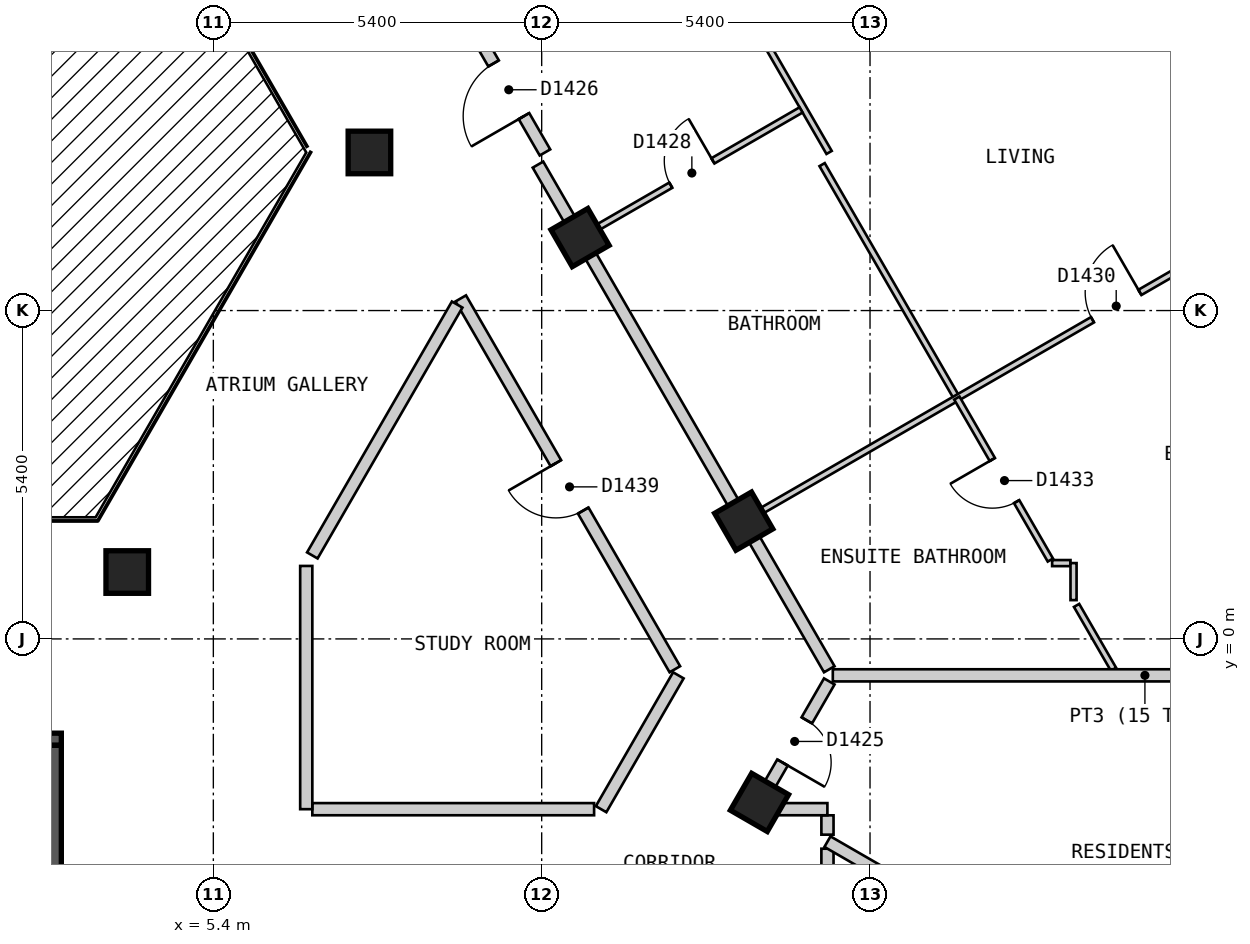
"""IFC4 building model, lengths in metres.
Left out: names, types, materials, properties, quantities, classifications, styles, units other than length and angle.
Written with IfcOpenShell. Run it as: python <this file> out.ifc"""

import sys

from ifc_helpers import new_model, si_unit, direction, frame, frame_2d, origin, origin_2d, place, context, subcontext, project, spatial, polyline, rectangle, outline, extrude, element, fill, save


model = new_model("IFC4")
c1 = context("Model", 3, precision=1e-05, world=origin(), true_north=direction((0.0, 1.0)))
c2 = subcontext(c1, "Body", "Model", "MODEL_VIEW")
j1 = project(units=[si_unit("LENGTHUNIT", "METRE"), si_unit("PLANEANGLEUNIT", "RADIAN")], contexts=[c1])
p1 = place(None, origin())
s1 = spatial("IfcSite", under=j1, at=p1, CompositionType="ELEMENT")
p2 = place(p1, origin())
s2 = spatial("IfcBuilding", under=s1, at=p2, CompositionType="ELEMENT")
p3 = place(p2, frame((0.0, 0.0, 166.2)))
s3 = spatial("IfcBuildingStorey", under=s2, at=p3, CompositionType="ELEMENT", Elevation=166.2)
for number, where, z_axis, x_axis in (
    (1, (14.382, -2.689, 0.0), (0.0, 0.0, 1.0), (0.5, 0.866, 0.0)),
    (2, (14.123, 1.937, 0.0), (0.0, 0.0, 1.0), (-0.5, 0.866, 0.0)),
    (3, (3.984, 1.1, 0.0), (0.0, 0.0, 1.0), (1.0, 0.0, 0.0)),
    (4, (11.431, 6.6, 0.0), (0.0, 0.0, 1.0), (-0.5, 0.866, 0.0)),
    (5, (7.967, 8.0, 0.0), (0.0, 0.0, 1.0), (1.0, 0.0, 0.0)),
):
    element("IfcColumn", number, at=place(p3, frame(where, z_axis=z_axis, x_axis=x_axis)), inside=s3, PredefinedType="COLUMN", context=c2, shape_type="SweptSolid", body=[
        extrude(rectangle(XDim=0.7, YDim=0.7, at=origin_2d()), origin(), (0.0, 0.0, 1.0), 3.0),
    ])
p4 = place(p3, frame((15.631, -21.025, 0.0), z_axis=(0.0, 0.0, 1.0), x_axis=(0.500018670445, 0.86601462413, 0.0)))
e6 = element("IfcWall", 6, at=p4, inside=s3, PredefinedType="SOLIDWALL", context=c2, shape_type="SweptSolid", body=[
    extrude(outline(polyline([(0.0, -0.15), (20.785, -0.15), (20.705, 0.15), (0.08, 0.15), (0.0, -0.15)])), origin(), (0.0, 0.0, 1.0), 2.7),
])
p5 = place(p4, frame((1.13, 0.0, 0.15)))
e7 = element("IfcOpeningElement", 7, at=p5, cuts=e6, PredefinedType="OPENING", context=c2, shape_type="SweptSolid", body=[
    extrude(rectangle(XDim=1.5, YDim=2.1, at=frame_2d((0.75, 1.05))), frame((0.0, 0.16, 0.0), z_axis=(0.0, -1.0, 0.0), x_axis=(1.0, 0.0, 0.0)), (0.0, 0.0, 1.0), 0.32),
])
p6 = place(p4, frame((3.562, 0.0, 0.15)))
e8 = element("IfcOpeningElement", 8, at=p6, cuts=e6, PredefinedType="OPENING", context=c2, shape_type="SweptSolid", body=[
    extrude(rectangle(XDim=1.5, YDim=2.1, at=frame_2d((0.75, 1.05))), frame((0.0, 0.16, 0.0), z_axis=(0.0, -1.0, 0.0), x_axis=(1.0, 0.0, 0.0)), (0.0, 0.0, 1.0), 0.32),
])
p7 = place(p4, frame((5.994, 0.0, 0.15)))
e9 = element("IfcOpeningElement", 9, at=p7, cuts=e6, PredefinedType="OPENING", context=c2, shape_type="SweptSolid", body=[
    extrude(rectangle(XDim=1.5, YDim=2.1, at=frame_2d((0.75, 1.05))), frame((0.0, 0.16, 0.0), z_axis=(0.0, -1.0, 0.0), x_axis=(1.0, 0.0, 0.0)), (0.0, 0.0, 1.0), 0.32),
])
p8 = place(p4, frame((8.425, 0.0, 0.15)))
e10 = element("IfcOpeningElement", 10, at=p8, cuts=e6, PredefinedType="OPENING", context=c2, shape_type="SweptSolid", body=[
    extrude(rectangle(XDim=1.5, YDim=2.1, at=frame_2d((0.75, 1.05))), frame((0.0, 0.16, 0.0), z_axis=(0.0, -1.0, 0.0), x_axis=(1.0, 0.0, 0.0)), (0.0, 0.0, 1.0), 0.32),
])
p9 = place(p4, frame((10.857, 0.0, 0.15)))
e11 = element("IfcOpeningElement", 11, at=p9, cuts=e6, PredefinedType="OPENING", context=c2, shape_type="SweptSolid", body=[
    extrude(rectangle(XDim=1.5, YDim=2.1, at=frame_2d((0.75, 1.05))), frame((0.0, 0.16, 0.0), z_axis=(0.0, -1.0, 0.0), x_axis=(1.0, 0.0, 0.0)), (0.0, 0.0, 1.0), 0.32),
])
p10 = place(p4, frame((13.289, 0.0, 0.15)))
e12 = element("IfcOpeningElement", 12, at=p10, cuts=e6, PredefinedType="OPENING", context=c2, shape_type="SweptSolid", body=[
    extrude(rectangle(XDim=1.5, YDim=2.1, at=frame_2d((0.75, 1.05))), frame((0.0, 0.16, 0.0), z_axis=(0.0, -1.0, 0.0), x_axis=(1.0, 0.0, 0.0)), (0.0, 0.0, 1.0), 0.32),
])
p11 = place(p4, frame((15.722, 0.0, 0.15)))
e13 = element("IfcOpeningElement", 13, at=p11, cuts=e6, PredefinedType="OPENING", context=c2, shape_type="SweptSolid", body=[
    extrude(rectangle(XDim=1.5, YDim=2.1, at=frame_2d((0.75, 1.05))), frame((0.0, 0.16, 0.0), z_axis=(0.0, -1.0, 0.0), x_axis=(1.0, 0.0, 0.0)), (0.0, 0.0, 1.0), 0.32),
])
p12 = place(p4, frame((18.154, 0.0, 0.15)))
e14 = element("IfcOpeningElement", 14, at=p12, cuts=e6, PredefinedType="OPENING", context=c2, shape_type="SweptSolid", body=[
    extrude(rectangle(XDim=1.5, YDim=2.1, at=frame_2d((0.75, 1.05))), frame((0.0, 0.16, 0.0), z_axis=(0.0, -1.0, 0.0), x_axis=(1.0, 0.0, 0.0)), (0.0, 0.0, 1.0), 0.32),
])
p13 = place(p3, frame((26.024, 1.825, 0.0), z_axis=(0.0, 0.0, 1.0), x_axis=(-0.500010537973, 0.866019319597, 0.0)))
e15 = element("IfcWall", 15, at=p13, inside=s3, PredefinedType="SOLIDWALL", context=c2, shape_type="SweptSolid", body=[
    extrude(outline(polyline([(0.0, -0.15), (22.863, -0.15), (22.783, 0.15), (0.08, 0.15), (0.0, -0.15)])), origin(), (0.0, 0.0, 1.0), 2.7),
])
p14 = place(p13, frame((1.259, 0.0, 0.15)))
e16 = element("IfcOpeningElement", 16, at=p14, cuts=e15, PredefinedType="OPENING", context=c2, shape_type="SweptSolid", body=[
    extrude(rectangle(XDim=1.5, YDim=2.1, at=frame_2d((0.75, 1.05))), frame((0.0, 0.16, 0.0), z_axis=(0.0, -1.0, 0.0), x_axis=(1.0, 0.0, 0.0)), (0.0, 0.0, 1.0), 0.32),
])
p15 = place(p13, frame((3.952, 0.0, 0.15)))
e17 = element("IfcOpeningElement", 17, at=p15, cuts=e15, PredefinedType="OPENING", context=c2, shape_type="SweptSolid", body=[
    extrude(rectangle(XDim=1.5, YDim=2.1, at=frame_2d((0.75, 1.05))), frame((0.0, 0.16, 0.0), z_axis=(0.0, -1.0, 0.0), x_axis=(1.0, 0.0, 0.0)), (0.0, 0.0, 1.0), 0.32),
])
p16 = place(p13, frame((6.644, 0.0, 0.15)))
e18 = element("IfcOpeningElement", 18, at=p16, cuts=e15, PredefinedType="OPENING", context=c2, shape_type="SweptSolid", body=[
    extrude(rectangle(XDim=1.5, YDim=2.1, at=frame_2d((0.75, 1.05))), frame((0.0, 0.16, 0.0), z_axis=(0.0, -1.0, 0.0), x_axis=(1.0, 0.0, 0.0)), (0.0, 0.0, 1.0), 0.32),
])
p17 = place(p13, frame((9.335, 0.0, 0.15)))
e19 = element("IfcOpeningElement", 19, at=p17, cuts=e15, PredefinedType="OPENING", context=c2, shape_type="SweptSolid", body=[
    extrude(rectangle(XDim=1.5, YDim=2.1, at=frame_2d((0.75, 1.05))), frame((0.0, 0.16, 0.0), z_axis=(0.0, -1.0, 0.0), x_axis=(1.0, 0.0, 0.0)), (0.0, 0.0, 1.0), 0.32),
])
p18 = place(p13, frame((12.028, 0.0, 0.15)))
e20 = element("IfcOpeningElement", 20, at=p18, cuts=e15, PredefinedType="OPENING", context=c2, shape_type="SweptSolid", body=[
    extrude(rectangle(XDim=1.5, YDim=2.1, at=frame_2d((0.75, 1.05))), frame((0.0, 0.16, 0.0), z_axis=(0.0, -1.0, 0.0), x_axis=(1.0, 0.0, 0.0)), (0.0, 0.0, 1.0), 0.32),
])
p19 = place(p13, frame((14.72, 0.0, 0.15)))
e21 = element("IfcOpeningElement", 21, at=p19, cuts=e15, PredefinedType="OPENING", context=c2, shape_type="SweptSolid", body=[
    extrude(rectangle(XDim=1.5, YDim=2.1, at=frame_2d((0.75, 1.05))), frame((0.0, 0.16, 0.0), z_axis=(0.0, -1.0, 0.0), x_axis=(1.0, 0.0, 0.0)), (0.0, 0.0, 1.0), 0.32),
])
p20 = place(p13, frame((17.411, 0.0, 0.15)))
e22 = element("IfcOpeningElement", 22, at=p20, cuts=e15, PredefinedType="OPENING", context=c2, shape_type="SweptSolid", body=[
    extrude(rectangle(XDim=1.5, YDim=2.1, at=frame_2d((0.75, 1.05))), frame((0.0, 0.16, 0.0), z_axis=(0.0, -1.0, 0.0), x_axis=(1.0, 0.0, 0.0)), (0.0, 0.0, 1.0), 0.32),
])
p21 = place(p13, frame((20.104, 0.0, 0.15)))
e23 = element("IfcOpeningElement", 23, at=p21, cuts=e15, PredefinedType="OPENING", context=c2, shape_type="SweptSolid", body=[
    extrude(rectangle(XDim=1.5, YDim=2.1, at=frame_2d((0.75, 1.05))), frame((0.0, 0.16, 0.0), z_axis=(0.0, -1.0, 0.0), x_axis=(1.0, 0.0, 0.0)), (0.0, 0.0, 1.0), 0.32),
])
p22 = place(p3, frame((-2.9, -1.65, 0.0), z_axis=(0.0, 0.0, 1.0), x_axis=(1.0, 0.0, 0.0)))
e24 = element("IfcWall", 24, at=p22, inside=s3, PredefinedType="SOLIDWALL", context=c2, shape_type="SweptSolid", body=[
    extrude(rectangle(XDim=5.8, YDim=0.2, at=frame_2d((2.9, 0.0))), origin(), (0.0, 0.0, 1.0), 2.7),
])
p23 = place(p22, frame((0.3, 0.0, 0.0)))
e25 = element("IfcOpeningElement", 25, at=p23, cuts=e24, PredefinedType="OPENING", context=c2, shape_type="SweptSolid", body=[
    extrude(rectangle(XDim=1.2, YDim=2.1, at=frame_2d((0.6, 1.05))), frame((0.0, 0.11, 0.0), z_axis=(0.0, -1.0, 0.0), x_axis=(1.0, 0.0, 0.0)), (0.0, 0.0, 1.0), 0.22),
])
p24 = place(p3, frame((2.8, -4.5, 0.0), z_axis=(0.0, 0.0, 1.0), x_axis=(0.0, 1.0, 0.0)))
e26 = element("IfcWall", 26, at=p24, inside=s3, PredefinedType="SOLIDWALL", context=c2, shape_type="SweptSolid", body=[
    extrude(rectangle(XDim=2.75, YDim=0.2, at=frame_2d((1.375, 0.0))), origin(), (0.0, 0.0, 1.0), 2.7),
])
p25 = place(p3, frame((9.469, 5.6, 0.0), z_axis=(0.0, 0.0, 1.0), x_axis=(0.499964524401, -0.866045884662, 0.0)))
e27 = element("IfcWall", 27, at=p25, inside=s3, PredefinedType="PARTITIONING", context=c2, shape_type="SweptSolid", body=[
    extrude(rectangle(XDim=7.042, YDim=0.2, at=frame_2d((3.521, 0.0))), origin(), (0.0, 0.0, 1.0), 2.7),
])
p26 = place(p25, frame((3.129, 0.0, 0.0)))
e28 = element("IfcOpeningElement", 28, at=p26, cuts=e27, PredefinedType="OPENING", context=c2, shape_type="SweptSolid", body=[
    extrude(rectangle(XDim=0.9, YDim=2.1, at=frame_2d((0.45, 1.05))), frame((0.0, 0.11, 0.0), z_axis=(0.0, -1.0, 0.0), x_axis=(1.0, 0.0, 0.0)), (0.0, 0.0, 1.0), 0.22),
])
p27 = place(p3, frame((10.739, 7.8, 0.0), z_axis=(0.0, 0.0, 1.0), x_axis=(0.499964311759, -0.86604600742, 0.0)))
e29 = element("IfcWall", 29, at=p27, inside=s3, PredefinedType="PARTITIONING", context=c2, shape_type="SweptSolid", body=[
    extrude(rectangle(XDim=9.583, YDim=0.2, at=frame_2d((4.792, 0.0))), origin(), (0.0, 0.0, 1.0), 2.7),
])
p28 = place(p3, frame((5.485, 17.3, 0.0), z_axis=(0.0, 0.0, 1.0), x_axis=(0.499965832213, -0.866045129667, 0.0)))
e30 = element("IfcWall", 30, at=p28, inside=s3, PredefinedType="PARTITIONING", context=c2, shape_type="SweptSolid", body=[
    extrude(rectangle(XDim=10.739, YDim=0.2, at=frame_2d((5.369, 0.0))), origin(), (0.0, 0.0, 1.0), 2.7),
])
p29 = place(p28, frame((9.048, 0.0, 0.0)))
e31 = element("IfcOpeningElement", 31, at=p29, cuts=e30, PredefinedType="OPENING", context=c2, shape_type="SweptSolid", body=[
    extrude(rectangle(XDim=1.0, YDim=2.1, at=frame_2d((0.5, 1.05))), frame((0.0, 0.11, 0.0), z_axis=(0.0, -1.0, 0.0), x_axis=(1.0, 0.0, 0.0)), (0.0, 0.0, 1.0), 0.22),
])
p30 = place(p28, frame((0.161, 0.0, 0.0)))
e32 = element("IfcOpeningElement", 32, at=p30, cuts=e30, PredefinedType="OPENING", context=c2, shape_type="SweptSolid", body=[
    extrude(rectangle(XDim=0.9, YDim=2.1, at=frame_2d((0.45, 1.05))), frame((0.0, 0.11, 0.0), z_axis=(0.0, -1.0, 0.0), x_axis=(1.0, 0.0, 0.0)), (0.0, 0.0, 1.0), 0.22),
])
p31 = place(p3, frame((15.5, -2.901, 0.0), z_axis=(0.0, 0.0, 1.0), x_axis=(0.0, -1.0, 0.0)))
e33 = element("IfcWall", 33, at=p31, inside=s3, PredefinedType="PARTITIONING", context=c2, shape_type="SweptSolid", body=[
    extrude(rectangle(XDim=0.318, YDim=0.2, at=frame_2d((0.159, 0.0))), origin(), (0.0, 0.0, 1.0), 2.7),
])
p32 = place(p3, frame((7.028, -2.8, 0.0), z_axis=(0.0, 0.0, 1.0), x_axis=(1.0, 0.0, 0.0)))
e34 = element("IfcWall", 34, at=p32, inside=s3, PredefinedType="PARTITIONING", context=c2, shape_type="SweptSolid", body=[
    extrude(rectangle(XDim=4.634, YDim=0.2, at=frame_2d((2.317, 0.0))), origin(), (0.0, 0.0, 1.0), 2.7),
])
p33 = place(p3, frame((14.433, -2.8, 0.0), z_axis=(0.0, 0.0, 1.0), x_axis=(1.0, 0.0, 0.0)))
e35 = element("IfcWall", 35, at=p33, inside=s3, PredefinedType="PARTITIONING", context=c2, shape_type="SweptSolid", body=[
    extrude(rectangle(XDim=1.066, YDim=0.2, at=frame_2d((0.533, 0.0))), origin(), (0.0, 0.0, 1.0), 2.7),
])
p34 = place(p3, frame((7.028, 1.373, 0.0), z_axis=(0.0, 0.0, 1.0), x_axis=(0.499953126767, 0.866052464367, 0.0)))
e36 = element("IfcWall", 36, at=p34, inside=s3, PredefinedType="PARTITIONING", context=c2, shape_type="SweptSolid", body=[
    extrude(rectangle(XDim=4.764, YDim=0.2, at=frame_2d((2.382, 0.0))), origin(), (0.0, 0.0, 1.0), 2.7),
])
p35 = place(p3, frame((11.777, -2.8, 0.0), z_axis=(0.0, 0.0, 1.0), x_axis=(0.500085537782, 0.86597601289, 0.0)))
e37 = element("IfcWall", 37, at=p35, inside=s3, PredefinedType="PARTITIONING", context=c2, shape_type="SweptSolid", body=[
    extrude(rectangle(XDim=2.542, YDim=0.2, at=frame_2d((1.271, 0.0))), origin(), (0.0, 0.0, 1.0), 2.7),
])
p36 = place(p3, frame((14.318, -2.8, 0.0), z_axis=(0.0, 0.0, 1.0), x_axis=(0.49964693309, 0.866229151122, 0.0)))
e38 = element("IfcWall", 38, at=p36, inside=s3, PredefinedType="PARTITIONING", context=c2, shape_type="SweptSolid", body=[
    extrude(rectangle(XDim=2.426, YDim=0.2, at=frame_2d((1.213, 0.0))), origin(), (0.0, 0.0, 1.0), 2.7),
])
p37 = place(p36, frame((0.886, 0.0, 0.0)))
e39 = element("IfcOpeningElement", 39, at=p37, cuts=e38, PredefinedType="OPENING", context=c2, shape_type="SweptSolid", body=[
    extrude(rectangle(XDim=0.8, YDim=2.1, at=frame_2d((0.4, 1.05))), frame((0.0, 0.11, 0.0), z_axis=(0.0, -1.0, 0.0), x_axis=(1.0, 0.0, 0.0)), (0.0, 0.0, 1.0), 0.22),
])
p38 = place(p3, frame((6.928, -2.8, 0.0), z_axis=(0.0, 0.0, 1.0), x_axis=(0.0, 1.0, 0.0)))
e40 = element("IfcWall", 40, at=p38, inside=s3, PredefinedType="PARTITIONING", context=c2, shape_type="SweptSolid", body=[
    extrude(rectangle(XDim=4.0, YDim=0.2, at=frame_2d((2.0, 0.0))), origin(), (0.0, 0.0, 1.0), 2.7),
])
p39 = place(p3, frame((15.5, -18.799, 0.0), z_axis=(0.0, 0.0, 1.0), x_axis=(0.0, 1.0, 0.0)))
e41 = element("IfcWall", 41, at=p39, inside=s3, PredefinedType="PARTITIONING", context=c2, shape_type="SweptSolid", body=[
    extrude(rectangle(XDim=15.349, YDim=0.2, at=frame_2d((7.675, 0.0))), origin(), (0.0, 0.0, 1.0), 2.7),
])
p40 = place(p39, frame((4.477, 0.0, 0.0)))
e42 = element("IfcOpeningElement", 42, at=p40, cuts=e41, PredefinedType="OPENING", context=c2, shape_type="SweptSolid", body=[
    extrude(rectangle(XDim=0.8, YDim=2.1, at=frame_2d((0.4, 1.05))), frame((0.0, 0.11, 0.0), z_axis=(0.0, -1.0, 0.0), x_axis=(1.0, 0.0, 0.0)), (0.0, 0.0, 1.0), 0.22),
])
p41 = place(p39, frame((11.348, 0.0, 0.0)))
e43 = element("IfcOpeningElement", 43, at=p41, cuts=e41, PredefinedType="OPENING", context=c2, shape_type="SweptSolid", body=[
    extrude(rectangle(XDim=1.0, YDim=2.1, at=frame_2d((0.5, 1.05))), frame((0.0, 0.11, 0.0), z_axis=(0.0, -1.0, 0.0), x_axis=(1.0, 0.0, 0.0)), (0.0, 0.0, 1.0), 0.22),
])
p42 = place(p3, frame((15.412, 7.8, 0.0), z_axis=(0.0, 0.0, 1.0), x_axis=(0.499882970317, -0.866092960361, 0.0)))
e44 = element("IfcWall", 44, at=p42, inside=s3, PredefinedType="PARTITIONING", context=c2, shape_type="SweptSolid", body=[
    extrude(rectangle(XDim=4.433, YDim=0.1, at=frame_2d((2.216, 0.0))), origin(), (0.0, 0.0, 1.0), 2.7),
])
p43 = place(p3, frame((19.597, 0.551, 0.0), z_axis=(0.0, 0.0, 1.0), x_axis=(0.500576018574, -0.86569258379, 0.0)))
e45 = element("IfcWall", 45, at=p43, inside=s3, PredefinedType="PARTITIONING", context=c2, shape_type="SweptSolid", body=[
    extrude(rectangle(XDim=1.213, YDim=0.1, at=frame_2d((0.606, 0.0))), origin(), (0.0, 0.0, 1.0), 2.7),
])
p44 = place(p3, frame((9.827, 17.874, 0.0), z_axis=(0.0, 0.0, 1.0), x_axis=(0.499962189394, -0.866047232647, 0.0)))
e46 = element("IfcWall", 46, at=p44, inside=s3, PredefinedType="PARTITIONING", context=c2, shape_type="SweptSolid", body=[
    extrude(rectangle(XDim=11.401, YDim=0.1, at=frame_2d((5.701, 0.0))), origin(), (0.0, 0.0, 1.0), 2.7),
])
p45 = place(p44, frame((7.433, 0.0, 0.0)))
e47 = element("IfcOpeningElement", 47, at=p45, cuts=e46, PredefinedType="OPENING", context=c2, shape_type="SweptSolid", body=[
    extrude(rectangle(XDim=0.9, YDim=2.1, at=frame_2d((0.45, 1.05))), frame((0.0, 0.06, 0.0), z_axis=(0.0, -1.0, 0.0), x_axis=(1.0, 0.0, 0.0)), (0.0, 0.0, 1.0), 0.12),
])
p46 = place(p3, frame((19.195, 1.247, 0.0), z_axis=(0.0, 0.0, 1.0), x_axis=(1.0, 0.0, 0.0)))
e48 = element("IfcWall", 48, at=p46, inside=s3, PredefinedType="PARTITIONING", context=c2, shape_type="SweptSolid", body=[
    extrude(rectangle(XDim=0.302, YDim=0.1, at=frame_2d((0.151, 0.0))), origin(), (0.0, 0.0, 1.0), 2.7),
])
p47 = place(p3, frame((19.547, 0.638, 0.0), z_axis=(0.0, 0.0, 1.0), x_axis=(0.0, 1.0, 0.0)))
e49 = element("IfcWall", 49, at=p47, inside=s3, PredefinedType="PARTITIONING", context=c2, shape_type="SweptSolid", body=[
    extrude(rectangle(XDim=0.609, YDim=0.1, at=frame_2d((0.305, 0.0))), origin(), (0.0, 0.0, 1.0), 2.7),
])
p48 = place(p3, frame((14.21, 1.987, 0.0), z_axis=(0.0, 0.0, 1.0), x_axis=(0.866022959057, 0.500004234368, 0.0)))
e50 = element("IfcWall", 50, at=p48, inside=s3, PredefinedType="PARTITIONING", context=c2, shape_type="SweptSolid", body=[
    extrude(rectangle(XDim=10.0, YDim=0.1, at=frame_2d((5.0, 0.0))), origin(), (0.0, 0.0, 1.0), 2.7),
])
p49 = place(p48, frame((6.523, 0.0, 0.0)))
e51 = element("IfcOpeningElement", 51, at=p49, cuts=e50, PredefinedType="OPENING", context=c2, shape_type="SweptSolid", body=[
    extrude(rectangle(XDim=0.9, YDim=2.1, at=frame_2d((0.45, 1.05))), frame((0.0, 0.06, 0.0), z_axis=(0.0, -1.0, 0.0), x_axis=(1.0, 0.0, 0.0)), (0.0, 0.0, 1.0), 0.12),
])
p50 = place(p3, frame((11.518, 6.65, 0.0), z_axis=(0.0, 0.0, 1.0), x_axis=(0.865949381454, 0.500131651427, 0.0)))
e52 = element("IfcWall", 52, at=p50, inside=s3, PredefinedType="PARTITIONING", context=c2, shape_type="SweptSolid", body=[
    extrude(rectangle(XDim=4.097, YDim=0.1, at=frame_2d((2.049, 0.0))), origin(), (0.0, 0.0, 1.0), 2.7),
])
p51 = place(p50, frame((1.623, 0.0, 0.0)))
e53 = element("IfcOpeningElement", 53, at=p51, cuts=e52, PredefinedType="OPENING", context=c2, shape_type="SweptSolid", body=[
    extrude(rectangle(XDim=0.8, YDim=2.1, at=frame_2d((0.4, 1.05))), frame((0.0, 0.06, 0.0), z_axis=(0.0, -1.0, 0.0), x_axis=(1.0, 0.0, 0.0)), (0.0, 0.0, 1.0), 0.12),
])
p52 = place(p3, frame((15.5, -3.334, 0.0), z_axis=(0.0, 0.0, 1.0), x_axis=(0.866001896501, -0.5000407136, 0.0)))
e54 = element("IfcWall", 54, at=p52, inside=s3, PredefinedType="PARTITIONING", context=c2, shape_type="SweptSolid", body=[
    extrude(rectangle(XDim=8.809, YDim=0.2, at=frame_2d((4.405, 0.0))), origin(), (0.0, 0.0, 1.0), 2.7),
])
p53 = place(p3, frame((15.588, -0.599, 0.0), z_axis=(0.0, 0.0, 1.0), x_axis=(1.0, 0.0, 0.0)))
e55 = element("IfcWall", 55, at=p53, inside=s3, PredefinedType="PARTITIONING", context=c2, shape_type="SweptSolid", body=[
    extrude(rectangle(XDim=10.266, YDim=0.2, at=frame_2d((5.133, 0.0))), origin(), (0.0, 0.0, 1.0), 2.7),
])
p54 = place(p3, frame((17.628, 3.961, 0.0), z_axis=(0.0, 0.0, 1.0), x_axis=(0.50003162148, -0.866007146345, 0.0)))
e56 = element("IfcWall", 56, at=p54, inside=s3, PredefinedType="PARTITIONING", context=c2, shape_type="SweptSolid", body=[
    extrude(rectangle(XDim=3.076, YDim=0.1, at=frame_2d((1.538, 0.0))), origin(), (0.0, 0.0, 1.0), 2.7),
])
p55 = place(p54, frame((1.167, 0.0, 0.0)))
e57 = element("IfcOpeningElement", 57, at=p55, cuts=e56, PredefinedType="OPENING", context=c2, shape_type="SweptSolid", body=[
    extrude(rectangle(XDim=0.8, YDim=2.1, at=frame_2d((0.4, 1.05))), frame((0.0, 0.06, 0.0), z_axis=(0.0, -1.0, 0.0), x_axis=(1.0, 0.0, 0.0)), (0.0, 0.0, 1.0), 0.12),
])
p56 = place(p37, origin())
e58 = element("IfcDoor", 58, at=p56, inside=s3, OperationType="SINGLE_SWING_LEFT", PredefinedType="DOOR", context=c2, shape_type="SweptSolid", body=[
    extrude(rectangle(XDim=0.8, YDim=2.1, at=frame_2d((0.4, 1.05))), frame((0.0, 0.025, 0.0), z_axis=(0.0, -1.0, 0.0), x_axis=(1.0, 0.0, 0.0)), (0.0, 0.0, 1.0), 0.05),
])
fill(e39, e58)
p57 = place(p29, origin())
e59 = element("IfcDoor", 59, at=p57, inside=s3, OperationType="SINGLE_SWING_RIGHT", PredefinedType="DOOR", context=c2, shape_type="SweptSolid", body=[
    extrude(rectangle(XDim=1.0, YDim=2.1, at=frame_2d((0.5, 1.05))), frame((0.0, 0.025, 0.0), z_axis=(0.0, -1.0, 0.0), x_axis=(1.0, 0.0, 0.0)), (0.0, 0.0, 1.0), 0.05),
])
fill(e31, e59)
p58 = place(p51, origin())
e60 = element("IfcDoor", 60, at=p58, inside=s3, OperationType="SINGLE_SWING_RIGHT", PredefinedType="DOOR", context=c2, shape_type="SweptSolid", body=[
    extrude(rectangle(XDim=0.8, YDim=2.1, at=frame_2d((0.4, 1.05))), frame((0.0, 0.025, 0.0), z_axis=(0.0, -1.0, 0.0), x_axis=(1.0, 0.0, 0.0)), (0.0, 0.0, 1.0), 0.05),
])
fill(e53, e60)
p59 = place(p49, origin())
e61 = element("IfcDoor", 61, at=p59, inside=s3, OperationType="SINGLE_SWING_RIGHT", PredefinedType="DOOR", context=c2, shape_type="SweptSolid", body=[
    extrude(rectangle(XDim=0.9, YDim=2.1, at=frame_2d((0.45, 1.05))), frame((0.0, 0.025, 0.0), z_axis=(0.0, -1.0, 0.0), x_axis=(1.0, 0.0, 0.0)), (0.0, 0.0, 1.0), 0.05),
])
fill(e51, e61)
p60 = place(p55, origin())
e62 = element("IfcDoor", 62, at=p60, inside=s3, OperationType="SINGLE_SWING_LEFT", PredefinedType="DOOR", context=c2, shape_type="SweptSolid", body=[
    extrude(rectangle(XDim=0.8, YDim=2.1, at=frame_2d((0.4, 1.05))), frame((0.0, 0.025, 0.0), z_axis=(0.0, -1.0, 0.0), x_axis=(1.0, 0.0, 0.0)), (0.0, 0.0, 1.0), 0.05),
])
fill(e57, e62)
p61 = place(p26, origin())
e63 = element("IfcDoor", 63, at=p61, inside=s3, OperationType="SINGLE_SWING_LEFT", PredefinedType="DOOR", context=c2, shape_type="SweptSolid", body=[
    extrude(rectangle(XDim=0.9, YDim=2.1, at=frame_2d((0.45, 1.05))), frame((0.0, 0.025, 0.0), z_axis=(0.0, -1.0, 0.0), x_axis=(1.0, 0.0, 0.0)), (0.0, 0.0, 1.0), 0.05),
])
fill(e28, e63)
save(model, sys.argv[1])
